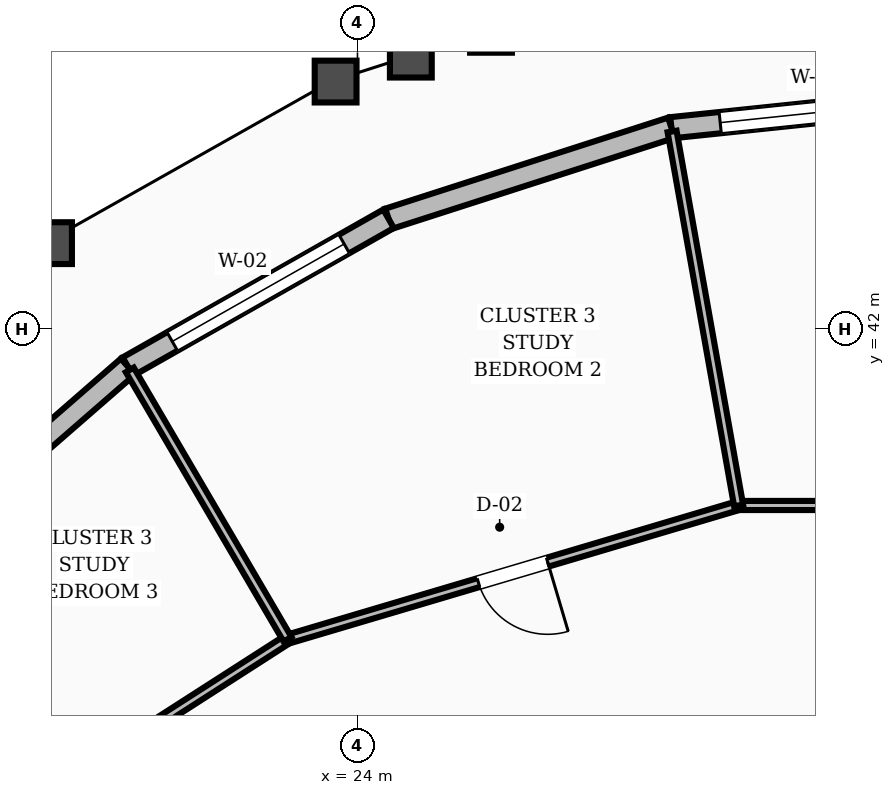
"""IFC4 building model, lengths in metres.
Left out: names, types, materials, properties, quantities, classifications, styles, units other than length and angle.
Written with IfcOpenShell. Run it as: python <this file> out.ifc"""

import sys

from ifc_helpers import new_model, si_unit, direction, frame, frame_2d, origin, place, context, subcontext, project, spatial, rectangle, extrude, element, fill, save


model = new_model("IFC4")
c1 = context("Model", 3, precision=1e-05, world=origin(), true_north=direction((0.0, 1.0)))
c2 = subcontext(c1, "Body", "Model", "MODEL_VIEW")
j1 = project(units=[si_unit("LENGTHUNIT", "METRE"), si_unit("PLANEANGLEUNIT", "RADIAN")], contexts=[c1])
p1 = place(None, origin())
s1 = spatial("IfcSite", under=j1, at=p1, CompositionType="ELEMENT")
p2 = place(p1, origin())
s2 = spatial("IfcBuilding", under=s1, at=p2, CompositionType="ELEMENT")
p3 = place(p2, frame((0.0, 0.0, 265.2)))
s3 = spatial("IfcBuildingStorey", under=s2, at=p3, CompositionType="ELEMENT", Elevation=265.2)
p4 = place(p3, frame((32.0, 45.049, 0.0), z_axis=(0.0, 0.0, 1.0), x_axis=(-0.9945804904, -0.103969457611, 0.0)))
e1 = element("IfcWall", 1, at=p4, inside=s3, PredefinedType="STANDARD", context=c2, shape_type="SweptSolid", body=[
    extrude(rectangle(XDim=3.891, YDim=0.28, at=frame_2d((1.945, 0.0))), origin(), (0.0, 0.0, 1.0), 2.88),
])
p5 = place(p4, frame((0.646, 0.0, 0.8)))
e2 = element("IfcOpeningElement", 2, at=p5, cuts=e1, PredefinedType="OPENING", context=c2, shape_type="SweptSolid", body=[
    extrude(rectangle(XDim=2.6, YDim=1.65, at=frame_2d((1.3, 0.825))), frame((0.0, 0.15, 0.0), z_axis=(0.0, -1.0, 0.0), x_axis=(1.0, 0.0, 0.0)), (0.0, 0.0, 1.0), 0.3),
])
p6 = place(p3, frame((28.13, 44.645, 0.0), z_axis=(0.0, 0.0, 1.0), x_axis=(-0.951905022268, -0.306393258053, 0.0)))
e3 = element("IfcWall", 3, at=p6, inside=s3, PredefinedType="STANDARD", context=c2, shape_type="SweptSolid", body=[
    extrude(rectangle(XDim=3.909, YDim=0.28, at=frame_2d((1.955, 0.0))), origin(), (0.0, 0.0, 1.0), 2.88),
])
p7 = place(p3, frame((24.409, 43.447, 0.0), z_axis=(0.0, 0.0, 1.0), x_axis=(-0.869835312163, -0.49334220346, 0.0)))
e4 = element("IfcWall", 4, at=p7, inside=s3, PredefinedType="STANDARD", context=c2, shape_type="SweptSolid", body=[
    extrude(rectangle(XDim=3.943, YDim=0.28, at=frame_2d((1.971, 0.0))), origin(), (0.0, 0.0, 1.0), 2.88),
])
p8 = place(p7, frame((0.671, 0.0, 0.8)))
e5 = element("IfcOpeningElement", 5, at=p8, cuts=e4, PredefinedType="OPENING", context=c2, shape_type="SweptSolid", body=[
    extrude(rectangle(XDim=2.6, YDim=1.65, at=frame_2d((1.3, 0.825))), frame((0.0, 0.15, 0.0), z_axis=(0.0, -1.0, 0.0), x_axis=(1.0, 0.0, 0.0)), (0.0, 0.0, 1.0), 0.3),
])
p9 = place(p3, frame((20.979, 41.502, 0.0), z_axis=(0.0, 0.0, 1.0), x_axis=(-0.75414910989, -0.656703220681, 0.0)))
e6 = element("IfcWall", 6, at=p9, inside=s3, PredefinedType="STANDARD", context=c2, shape_type="SweptSolid", body=[
    extrude(rectangle(XDim=3.986, YDim=0.28, at=frame_2d((1.993, 0.0))), origin(), (0.0, 0.0, 1.0), 2.88),
])
p10 = place(p3, frame((34.986, 39.675, 0.0), z_axis=(0.0, 0.0, 1.0), x_axis=(-1.0, 0.0, 0.0)))
e7 = element("IfcWall", 7, at=p10, inside=s3, PredefinedType="PARTITIONING", context=c2, shape_type="SweptSolid", body=[
    extrude(rectangle(XDim=5.971, YDim=0.12, at=frame_2d((2.986, 0.0))), origin(), (0.0, 0.0, 1.0), 2.87),
])
p11 = place(p10, frame((3.421, 0.0, 0.0)))
e8 = element("IfcOpeningElement", 8, at=p11, cuts=e7, PredefinedType="OPENING", context=c2, shape_type="SweptSolid", body=[
    extrude(rectangle(XDim=0.95, YDim=2.1, at=frame_2d((0.475, 1.05))), frame((0.0, 0.07, 0.0), z_axis=(0.0, -1.0, 0.0), x_axis=(1.0, 0.0, 0.0)), (0.0, 0.0, 1.0), 0.14),
])
p12 = place(p3, frame((29.014, 39.675, 0.0), z_axis=(0.0, 0.0, 1.0), x_axis=(-0.958730048682, -0.284317944833, 0.0)))
e9 = element("IfcWall", 9, at=p12, inside=s3, PredefinedType="PARTITIONING", context=c2, shape_type="SweptSolid", body=[
    extrude(rectangle(XDim=6.19, YDim=0.12, at=frame_2d((3.095, 0.0))), origin(), (0.0, 0.0, 1.0), 2.87),
])
p13 = place(p12, frame((2.62, 0.0, 0.0)))
e10 = element("IfcOpeningElement", 10, at=p13, cuts=e9, PredefinedType="OPENING", context=c2, shape_type="SweptSolid", body=[
    extrude(rectangle(XDim=0.95, YDim=2.1, at=frame_2d((0.475, 1.05))), frame((0.0, 0.07, 0.0), z_axis=(0.0, -1.0, 0.0), x_axis=(1.0, 0.0, 0.0)), (0.0, 0.0, 1.0), 0.14),
])
p14 = place(p3, frame((29.014, 39.675, 0.0), z_axis=(0.0, 0.0, 1.0), x_axis=(-0.175178551936, 0.984536680343, 0.0)))
e11 = element("IfcWall", 11, at=p14, inside=s3, PredefinedType="PARTITIONING", context=c2, shape_type="SweptSolid", body=[
    extrude(rectangle(XDim=4.998, YDim=0.12, at=frame_2d((2.499, 0.0))), origin(), (0.0, 0.0, 1.0), 2.87),
])
p15 = place(p3, frame((23.08, 37.915, 0.0), z_axis=(0.0, 0.0, 1.0), x_axis=(-0.841538391424, -0.540197311878, 0.0)))
e12 = element("IfcWall", 12, at=p15, inside=s3, PredefinedType="PARTITIONING", context=c2, shape_type="SweptSolid", body=[
    extrude(rectangle(XDim=6.873, YDim=0.12, at=frame_2d((3.437, 0.0))), origin(), (0.0, 0.0, 1.0), 2.87),
])
p16 = place(p15, frame((2.961, 0.0, 0.0)))
e13 = element("IfcOpeningElement", 13, at=p16, cuts=e12, PredefinedType="OPENING", context=c2, shape_type="SweptSolid", body=[
    extrude(rectangle(XDim=0.95, YDim=2.1, at=frame_2d((0.475, 1.05))), frame((0.0, 0.07, 0.0), z_axis=(0.0, -1.0, 0.0), x_axis=(1.0, 0.0, 0.0)), (0.0, 0.0, 1.0), 0.14),
])
p17 = place(p3, frame((23.08, 37.915, 0.0), z_axis=(0.0, 0.0, 1.0), x_axis=(-0.505267765721, 0.862962620814, 0.0)))
e14 = element("IfcWall", 14, at=p17, inside=s3, PredefinedType="PARTITIONING", context=c2, shape_type="SweptSolid", body=[
    extrude(rectangle(XDim=4.106, YDim=0.12, at=frame_2d((2.053, 0.0))), origin(), (0.0, 0.0, 1.0), 2.87),
])
p18 = place(p5, origin())
e15 = element("IfcWindow", 15, at=p18, inside=s3, PartitioningType="SINGLE_PANEL", PredefinedType="WINDOW", context=c2, shape_type="SweptSolid", body=[
    extrude(rectangle(XDim=2.6, YDim=1.65, at=frame_2d((1.3, 0.825))), frame((0.0, 0.03, 0.0), z_axis=(0.0, -1.0, 0.0), x_axis=(1.0, 0.0, 0.0)), (0.0, 0.0, 1.0), 0.06),
])
fill(e2, e15)
p19 = place(p8, origin())
e16 = element("IfcWindow", 16, at=p19, inside=s3, PartitioningType="SINGLE_PANEL", PredefinedType="WINDOW", context=c2, shape_type="SweptSolid", body=[
    extrude(rectangle(XDim=2.6, YDim=1.65, at=frame_2d((1.3, 0.825))), frame((0.0, 0.03, 0.0), z_axis=(0.0, -1.0, 0.0), x_axis=(1.0, 0.0, 0.0)), (0.0, 0.0, 1.0), 0.06),
])
fill(e5, e16)
p20 = place(p13, origin())
e17 = element("IfcDoor", 17, at=p20, inside=s3, OperationType="SINGLE_SWING_LEFT", PredefinedType="DOOR", context=c2, shape_type="SweptSolid", body=[
    extrude(rectangle(XDim=0.95, YDim=2.1, at=frame_2d((0.475, 1.05))), frame((0.0, 0.025, 0.0), z_axis=(0.0, -1.0, 0.0), x_axis=(1.0, 0.0, 0.0)), (0.0, 0.0, 1.0), 0.05),
])
fill(e10, e17)
save(model, sys.argv[1])
